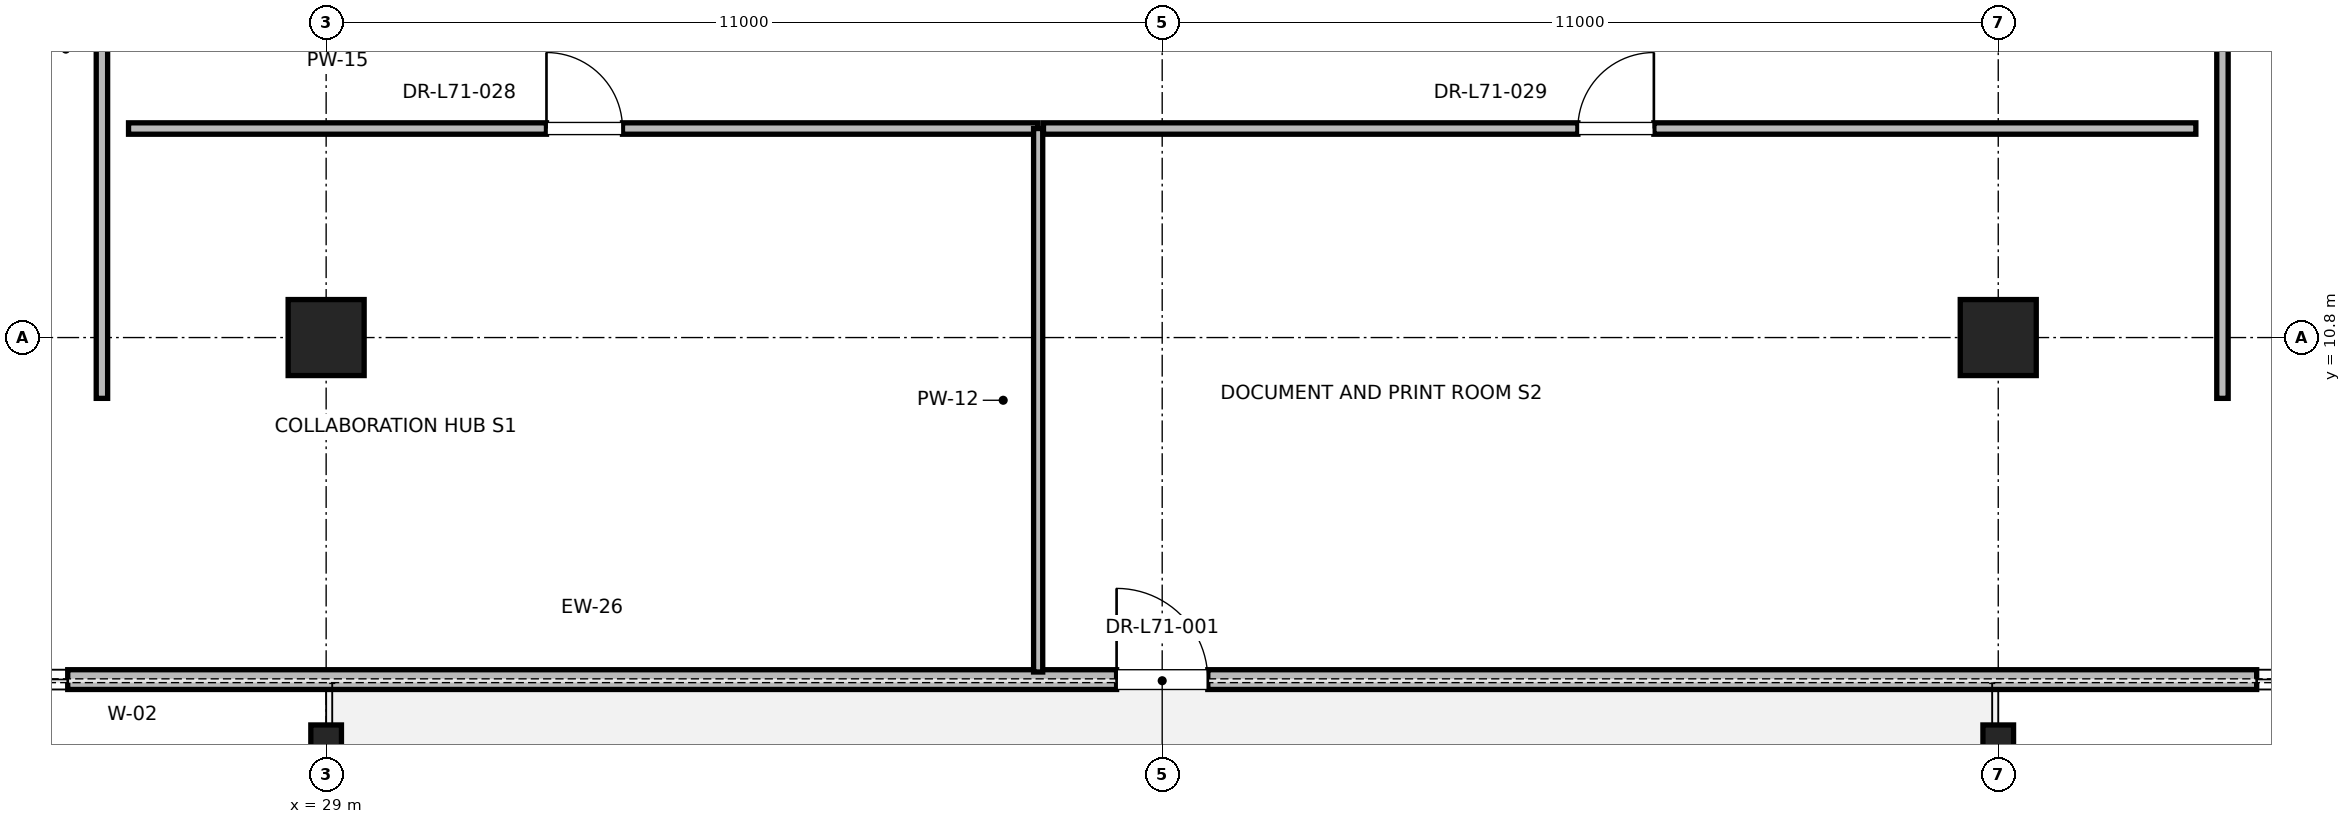
"""IFC4 building model, lengths in metres.
Left out: names, types, materials, properties, quantities, classifications, styles, units other than length and angle.
Written with IfcOpenShell. Run it as: python <this file> out.ifc"""

import sys

from ifc_helpers import new_model, si_unit, direction, frame, frame_2d, origin, origin_2d, place, context, subcontext, project, spatial, rectangle, i_section, extrude, element, fill, save


model = new_model("IFC4")
c1 = context("Model", 3, precision=1e-05, world=origin(), true_north=direction((0.0, 1.0)))
c2 = subcontext(c1, "Body", "Model", "MODEL_VIEW")
j1 = project(units=[si_unit("LENGTHUNIT", "METRE"), si_unit("PLANEANGLEUNIT", "RADIAN")], contexts=[c1])
p1 = place(None, origin())
s1 = spatial("IfcSite", under=j1, at=p1, CompositionType="ELEMENT")
p2 = place(p1, origin())
s2 = spatial("IfcBuilding", under=s1, at=p2, CompositionType="ELEMENT")
p3 = place(p2, frame((0.0, 0.0, 306.8)))
s3 = spatial("IfcBuildingStorey", under=s2, at=p3, CompositionType="ELEMENT", Elevation=306.8)
for number, where, z_axis, x_axis in (
    (1, (29.0, 10.8, 0.0), (0.0, 0.0, 1.0), (1.0, 0.0, 0.0)),
    (2, (51.0, 10.8, 0.0), (0.0, 0.0, 1.0), (1.0, 0.0, 0.0)),
):
    element("IfcColumn", number, at=place(p3, frame(where, z_axis=z_axis, x_axis=x_axis)), inside=s3, PredefinedType="COLUMN", context=c2, shape_type="SweptSolid", body=[
        extrude(rectangle(XDim=1.0, YDim=1.0, at=origin_2d()), origin(), (0.0, 0.0, 1.0), 4.0),
    ])
for number, where, z_axis, x_axis in (
    (3, (29.0, 5.5, 0.0), (0.0, 0.0, 1.0), (1.0, 0.0, 0.0)),
    (4, (51.0, 5.5, 0.0), (0.0, 0.0, 1.0), (1.0, 0.0, 0.0)),
):
    element("IfcColumn", number, at=place(p3, frame(where, z_axis=z_axis, x_axis=x_axis)), inside=s3, PredefinedType="COLUMN", context=c2, shape_type="SweptSolid", body=[
        extrude(i_section(OverallWidth=0.403, OverallDepth=0.406, WebThickness=0.027, FlangeThickness=0.043, FilletRadius=0.015, at=origin_2d()), origin(), (0.0, 0.0, 1.0), 4.0),
    ])
p4 = place(p3, frame((19.8, 6.3, 0.0), z_axis=(0.0, 0.0, 1.0), x_axis=(1.0, 0.0, 0.0)))
e5 = element("IfcWall", 5, at=p4, inside=s3, PredefinedType="PARAPET", context=c2, shape_type="SweptSolid", body=[
    extrude(rectangle(XDim=40.4, YDim=0.26, at=frame_2d((20.2, 0.0))), origin(), (0.0, 0.0, 1.0), 3.196),
])
p5 = place(p4, frame((4.2, 0.0, 0.85)))
e6 = element("IfcOpeningElement", 6, at=p5, cuts=e5, PredefinedType="OPENING", context=c2, shape_type="SweptSolid", body=[
    extrude(rectangle(XDim=1.6, YDim=2.1, at=frame_2d((0.8, 1.05))), frame((0.0, 0.13, 0.0), z_axis=(0.0, -1.0, 0.0), x_axis=(1.0, 0.0, 0.0)), (0.0, 0.0, 1.0), 0.26),
])
p6 = place(p4, frame((19.6, 0.0, 0.0)))
e7 = element("IfcOpeningElement", 7, at=p6, cuts=e5, PredefinedType="OPENING", context=c2, shape_type="SweptSolid", body=[
    extrude(rectangle(XDim=1.2, YDim=2.2, at=frame_2d((0.6, 1.1))), frame((0.0, 0.13, 0.0), z_axis=(0.0, -1.0, 0.0), x_axis=(1.0, 0.0, 0.0)), (0.0, 0.0, 1.0), 0.26),
])
p7 = place(p4, frame((34.6, 0.0, 0.85)))
e8 = element("IfcOpeningElement", 8, at=p7, cuts=e5, PredefinedType="OPENING", context=c2, shape_type="SweptSolid", body=[
    extrude(rectangle(XDim=1.6, YDim=2.1, at=frame_2d((0.8, 1.05))), frame((0.0, 0.13, 0.0), z_axis=(0.0, -1.0, 0.0), x_axis=(1.0, 0.0, 0.0)), (0.0, 0.0, 1.0), 0.26),
])
p8 = place(p3, frame((26.4, 13.55, 0.0), z_axis=(0.0, 0.0, 1.0), x_axis=(1.0, 0.0, 0.0)))
e9 = element("IfcWall", 9, at=p8, inside=s3, PredefinedType="PARTITIONING", context=c2, shape_type="SweptSolid", body=[
    extrude(rectangle(XDim=11.968, YDim=0.15, at=frame_2d((5.984, 0.0))), origin(), (0.0, 0.0, 1.0), 2.85),
])
p9 = place(p8, frame((5.499, 0.0, 0.0)))
e10 = element("IfcOpeningElement", 10, at=p9, cuts=e9, PredefinedType="OPENING", context=c2, shape_type="SweptSolid", body=[
    extrude(rectangle(XDim=1.0, YDim=2.15, at=frame_2d((0.5, 1.075))), frame((0.0, 0.075, 0.0), z_axis=(0.0, -1.0, 0.0), x_axis=(1.0, 0.0, 0.0)), (0.0, 0.0, 1.0), 0.15),
])
p10 = place(p3, frame((38.368, 6.4, 0.0), z_axis=(0.0, 0.0, 1.0), x_axis=(0.0, 1.0, 0.0)))
e11 = element("IfcWall", 11, at=p10, inside=s3, PredefinedType="PARTITIONING", context=c2, shape_type="SweptSolid", body=[
    extrude(rectangle(XDim=7.15, YDim=0.12, at=frame_2d((3.575, 0.0))), origin(), (0.0, 0.0, 1.0), 2.415),
])
p11 = place(p3, frame((38.438, 13.55, 0.0), z_axis=(0.0, 0.0, 1.0), x_axis=(1.0, 0.0, 0.0)))
e12 = element("IfcWall", 12, at=p11, inside=s3, PredefinedType="PARTITIONING", context=c2, shape_type="SweptSolid", body=[
    extrude(rectangle(XDim=15.162, YDim=0.15, at=frame_2d((7.581, 0.0))), origin(), (0.0, 0.0, 1.0), 2.85),
])
p12 = place(p11, frame((7.031, 0.0, 0.0)))
e13 = element("IfcOpeningElement", 13, at=p12, cuts=e12, PredefinedType="OPENING", context=c2, shape_type="SweptSolid", body=[
    extrude(rectangle(XDim=1.0, YDim=2.15, at=frame_2d((0.5, 1.075))), frame((0.0, 0.075, 0.0), z_axis=(0.0, -1.0, 0.0), x_axis=(1.0, 0.0, 0.0)), (0.0, 0.0, 1.0), 0.15),
])
p13 = place(p3, frame((26.05, 10.0, 0.0), z_axis=(0.0, 0.0, 1.0), x_axis=(0.0, 1.0, 0.0)))
e14 = element("IfcWall", 14, at=p13, inside=s3, PredefinedType="PARTITIONING", context=c2, shape_type="SweptSolid", body=[
    extrude(rectangle(XDim=10.85, YDim=0.15, at=frame_2d((5.425, 0.0))), origin(), (0.0, 0.0, 1.0), 2.85),
])
p14 = place(p13, frame((9.19, 0.0, 0.0)))
e15 = element("IfcOpeningElement", 15, at=p14, cuts=e14, PredefinedType="OPENING", context=c2, shape_type="SweptSolid", body=[
    extrude(rectangle(XDim=1.0, YDim=2.15, at=frame_2d((0.5, 1.075))), frame((0.0, 0.075, 0.0), z_axis=(0.0, -1.0, 0.0), x_axis=(1.0, 0.0, 0.0)), (0.0, 0.0, 1.0), 0.15),
])
p15 = place(p3, frame((53.95, 10.0, 0.0), z_axis=(0.0, 0.0, 1.0), x_axis=(0.0, 1.0, 0.0)))
e16 = element("IfcWall", 16, at=p15, inside=s3, PredefinedType="PARTITIONING", context=c2, shape_type="SweptSolid", body=[
    extrude(rectangle(XDim=12.6, YDim=0.15, at=frame_2d((6.3, 0.0))), origin(), (0.0, 0.0, 1.0), 2.85),
])
p16 = place(p15, frame((10.065, 0.0, 0.0)))
e17 = element("IfcOpeningElement", 17, at=p16, cuts=e16, PredefinedType="OPENING", context=c2, shape_type="SweptSolid", body=[
    extrude(rectangle(XDim=1.0, YDim=2.15, at=frame_2d((0.5, 1.075))), frame((0.0, 0.075, 0.0), z_axis=(0.0, -1.0, 0.0), x_axis=(1.0, 0.0, 0.0)), (0.0, 0.0, 1.0), 0.15),
])
p17 = place(p5, origin())
e18 = element("IfcWindow", 18, at=p17, inside=s3, PartitioningType="SINGLE_PANEL", PredefinedType="WINDOW", context=c2, shape_type="SweptSolid", body=[
    extrude(rectangle(XDim=1.6, YDim=2.1, at=frame_2d((0.8, 1.05))), frame((0.0, 0.03, 0.0), z_axis=(0.0, -1.0, 0.0), x_axis=(1.0, 0.0, 0.0)), (0.0, 0.0, 1.0), 0.06),
])
fill(e6, e18)
p18 = place(p6, origin())
e19 = element("IfcDoor", 19, at=p18, inside=s3, OperationType="SINGLE_SWING_LEFT", PredefinedType="DOOR", context=c2, shape_type="SweptSolid", body=[
    extrude(rectangle(XDim=1.2, YDim=2.2, at=frame_2d((0.6, 1.1))), frame((0.0, 0.025, 0.0), z_axis=(0.0, -1.0, 0.0), x_axis=(1.0, 0.0, 0.0)), (0.0, 0.0, 1.0), 0.05),
])
fill(e7, e19)
p19 = place(p7, origin())
e20 = element("IfcWindow", 20, at=p19, inside=s3, PartitioningType="SINGLE_PANEL", PredefinedType="WINDOW", context=c2, shape_type="SweptSolid", body=[
    extrude(rectangle(XDim=1.6, YDim=2.1, at=frame_2d((0.8, 1.05))), frame((0.0, 0.03, 0.0), z_axis=(0.0, -1.0, 0.0), x_axis=(1.0, 0.0, 0.0)), (0.0, 0.0, 1.0), 0.06),
])
fill(e8, e20)
p20 = place(p9, origin())
e21 = element("IfcDoor", 21, at=p20, inside=s3, OperationType="SINGLE_SWING_LEFT", PredefinedType="DOOR", context=c2, shape_type="SweptSolid", body=[
    extrude(rectangle(XDim=1.0, YDim=2.15, at=frame_2d((0.5, 1.075))), frame((0.0, 0.025, 0.0), z_axis=(0.0, -1.0, 0.0), x_axis=(1.0, 0.0, 0.0)), (0.0, 0.0, 1.0), 0.05),
])
fill(e10, e21)
p21 = place(p12, origin())
e22 = element("IfcDoor", 22, at=p21, inside=s3, OperationType="SINGLE_SWING_RIGHT", PredefinedType="DOOR", context=c2, shape_type="SweptSolid", body=[
    extrude(rectangle(XDim=1.0, YDim=2.15, at=frame_2d((0.5, 1.075))), frame((0.0, 0.025, 0.0), z_axis=(0.0, -1.0, 0.0), x_axis=(1.0, 0.0, 0.0)), (0.0, 0.0, 1.0), 0.05),
])
fill(e13, e22)
save(model, sys.argv[1])
